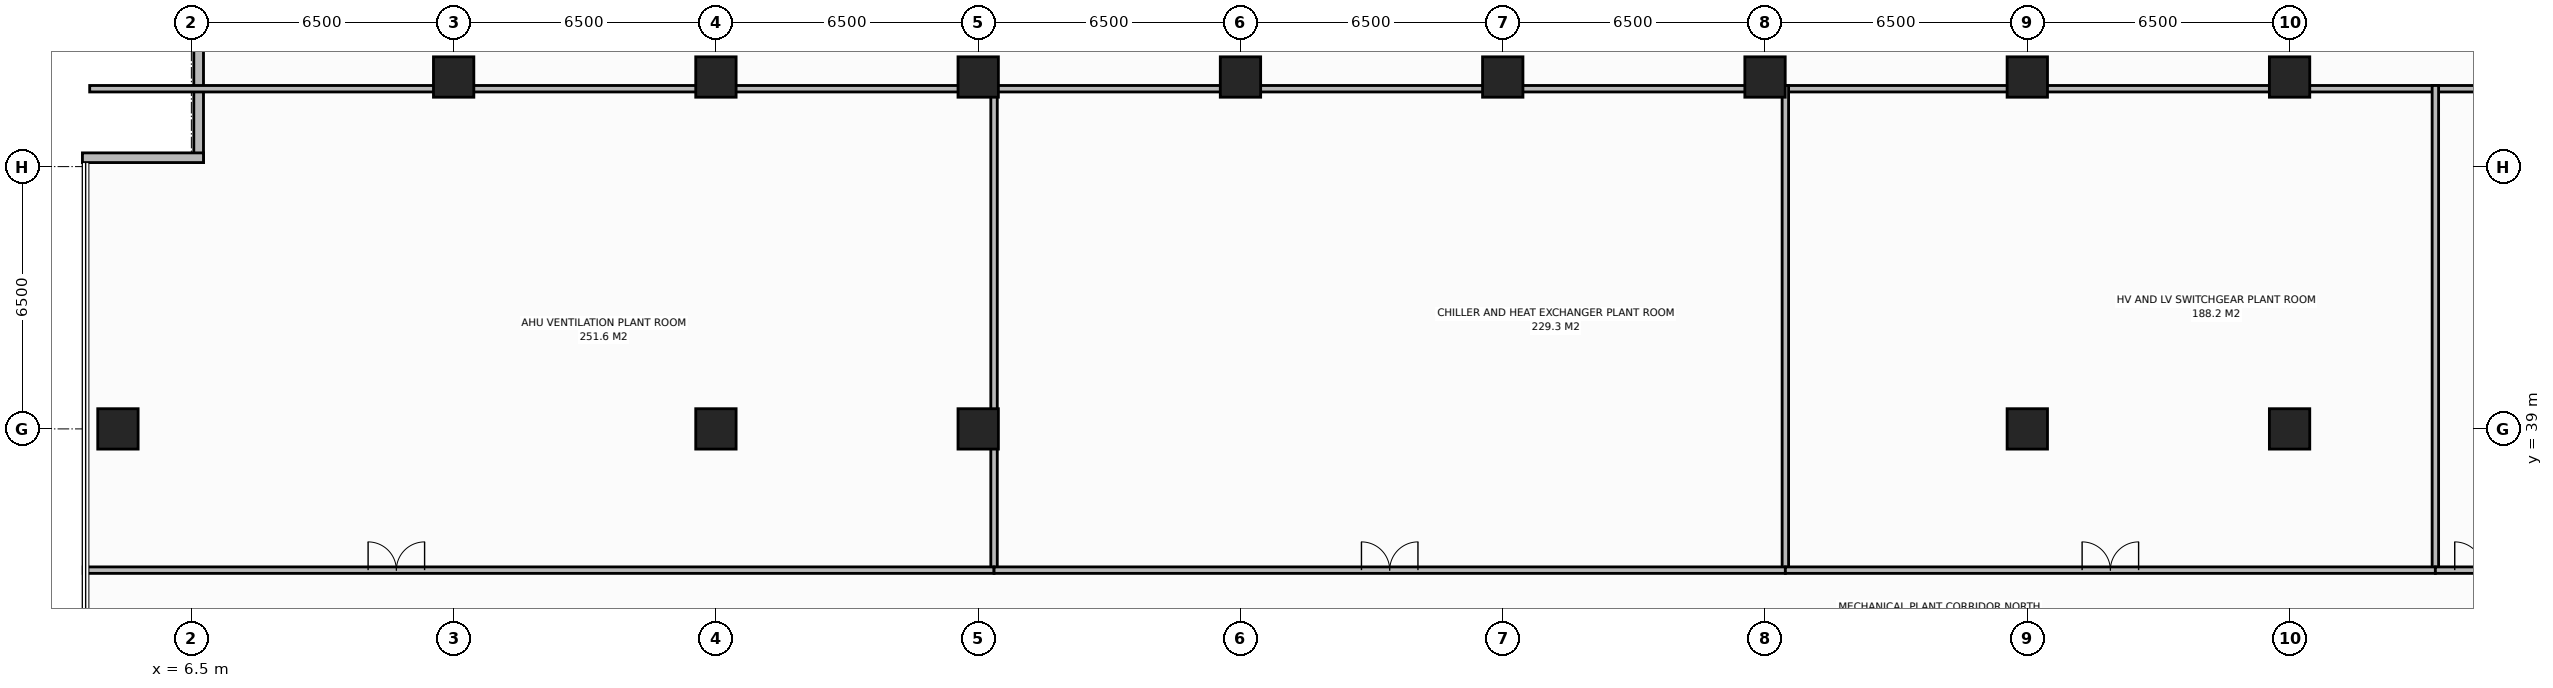
"""IFC4 building model, lengths in metres.
Left out: names, types, materials, properties, quantities, classifications, styles, units other than length and angle.
Written with IfcOpenShell. Run it as: python <this file> out.ifc"""

import sys

from ifc_helpers import new_model, si_unit, direction, frame, frame_2d, origin, origin_2d, place, context, subcontext, project, spatial, rectangle, extrude, element, fill, save


model = new_model("IFC4")
c1 = context("Model", 3, precision=1e-05, world=origin(), true_north=direction((0.0, 1.0)))
c2 = subcontext(c1, "Body", "Model", "MODEL_VIEW")
j1 = project(units=[si_unit("LENGTHUNIT", "METRE"), si_unit("PLANEANGLEUNIT", "RADIAN")], contexts=[c1])
p1 = place(None, origin())
s1 = spatial("IfcSite", under=j1, at=p1, CompositionType="ELEMENT")
p2 = place(p1, origin())
s2 = spatial("IfcBuilding", under=s1, at=p2, CompositionType="ELEMENT")
p3 = place(p2, frame((0.0, 0.0, 197.4)))
s3 = spatial("IfcBuildingStorey", under=s2, at=p3, CompositionType="ELEMENT", Elevation=197.4)
for number, where, z_axis, x_axis in (
    (1, (19.5, 39.0, 0.0), (0.0, 0.0, 1.0), (1.0, 0.0, 0.0)),
    (2, (58.5, 39.0, 0.0), (0.0, 0.0, 1.0), (1.0, 0.0, 0.0)),
    (3, (26.0, 39.0, 0.0), (0.0, 0.0, 1.0), (1.0, 0.0, 0.0)),
    (4, (52.0, 39.0, 0.0), (0.0, 0.0, 1.0), (1.0, 0.0, 0.0)),
    (5, (13.0, 47.72, 0.0), (0.0, 0.0, 1.0), (1.0, 0.0, 0.0)),
    (6, (19.5, 47.72, 0.0), (0.0, 0.0, 1.0), (1.0, 0.0, 0.0)),
    (7, (26.0, 47.72, 0.0), (0.0, 0.0, 1.0), (1.0, 0.0, 0.0)),
    (8, (32.5, 47.72, 0.0), (0.0, 0.0, 1.0), (1.0, 0.0, 0.0)),
    (9, (39.0, 47.72, 0.0), (0.0, 0.0, 1.0), (1.0, 0.0, 0.0)),
    (10, (45.5, 47.72, 0.0), (0.0, 0.0, 1.0), (1.0, 0.0, 0.0)),
    (11, (52.0, 47.72, 0.0), (0.0, 0.0, 1.0), (1.0, 0.0, 0.0)),
    (12, (58.5, 47.72, 0.0), (0.0, 0.0, 1.0), (1.0, 0.0, 0.0)),
    (13, (4.68, 39.0, 0.0), (0.0, 0.0, 1.0), (1.0, 0.0, 0.0)),
):
    element("IfcColumn", number, at=place(p3, frame(where, z_axis=z_axis, x_axis=x_axis)), inside=s3, PredefinedType="COLUMN", context=c2, shape_type="SweptSolid", body=[
        extrude(rectangle(XDim=1.0, YDim=1.0, at=origin_2d()), origin(), (0.0, 0.0, 1.0), 5.0),
    ])
for number, where, z_axis, x_axis in (
    (14, (6.68, 45.6, 0.0), (0.0, 0.0, 1.0), (0.0, 1.0, 0.0)),
    (15, (3.8, 45.72, 0.0), (0.0, 0.0, 1.0), (1.0, 0.0, 0.0)),
):
    element("IfcWall", number, at=place(p3, frame(where, z_axis=z_axis, x_axis=x_axis)), inside=s3, PredefinedType="STANDARD", context=c2, shape_type="SweptSolid", body=[
        extrude(rectangle(XDim=3.0, YDim=0.24, at=frame_2d((1.5, 0.0))), origin(), (0.0, 0.0, 1.0), 4.78),
    ])
p4 = place(p3, frame((3.98, 47.43, 0.0), z_axis=(0.0, 0.0, 1.0), x_axis=(1.0, 0.0, 0.0)))
e16 = element("IfcWall", 16, at=p4, inside=s3, PredefinedType="STANDARD", context=c2, shape_type="SweptSolid", body=[
    extrude(rectangle(XDim=70.04, YDim=0.16, at=frame_2d((35.02, 0.0))), origin(), (0.0, 0.0, 1.0), 4.78),
])
p5 = place(p3, frame((26.393, 35.5, 0.0), z_axis=(0.0, 0.0, 1.0), x_axis=(0.0, 1.0, 0.0)))
e17 = element("IfcWall", 17, at=p5, inside=s3, PredefinedType="STANDARD", context=c2, shape_type="SweptSolid", body=[
    extrude(rectangle(XDim=12.01, YDim=0.16, at=frame_2d((6.005, 0.0))), origin(), (0.0, 0.0, 1.0), 3.26),
])
p6 = place(p3, frame((3.82, 35.5, 0.0), z_axis=(0.0, 0.0, 1.0), x_axis=(1.0, 0.0, 0.0)))
e18 = element("IfcWall", 18, at=p6, inside=s3, PredefinedType="STANDARD", context=c2, shape_type="SweptSolid", body=[
    extrude(rectangle(XDim=22.573, YDim=0.16, at=frame_2d((11.286, 0.0))), origin(), (0.0, 0.0, 1.0), 4.78),
])
p7 = place(p6, frame((7.06, 0.0, 0.0)))
e19 = element("IfcOpeningElement", 19, at=p7, cuts=e18, PredefinedType="OPENING", context=c2, shape_type="SweptSolid", body=[
    extrude(rectangle(XDim=1.4, YDim=2.2, at=frame_2d((0.7, 1.1))), frame((0.0, 0.09, 0.0), z_axis=(0.0, -1.0, 0.0), x_axis=(1.0, 0.0, 0.0)), (0.0, 0.0, 1.0), 0.18),
])
p8 = place(p3, frame((46.004, 35.5, 0.0), z_axis=(0.0, 0.0, 1.0), x_axis=(0.0, 1.0, 0.0)))
e20 = element("IfcWall", 20, at=p8, inside=s3, PredefinedType="STANDARD", context=c2, shape_type="SweptSolid", body=[
    extrude(rectangle(XDim=12.01, YDim=0.16, at=frame_2d((6.005, 0.0))), origin(), (0.0, 0.0, 1.0), 3.26),
])
p9 = place(p3, frame((26.393, 35.5, 0.0), z_axis=(0.0, 0.0, 1.0), x_axis=(1.0, 0.0, 0.0)))
e21 = element("IfcWall", 21, at=p9, inside=s3, PredefinedType="STANDARD", context=c2, shape_type="SweptSolid", body=[
    extrude(rectangle(XDim=19.611, YDim=0.16, at=frame_2d((9.806, 0.0))), origin(), (0.0, 0.0, 1.0), 4.78),
])
p10 = place(p9, frame((9.106, 0.0, 0.0)))
e22 = element("IfcOpeningElement", 22, at=p10, cuts=e21, PredefinedType="OPENING", context=c2, shape_type="SweptSolid", body=[
    extrude(rectangle(XDim=1.4, YDim=2.2, at=frame_2d((0.7, 1.1))), frame((0.0, 0.09, 0.0), z_axis=(0.0, -1.0, 0.0), x_axis=(1.0, 0.0, 0.0)), (0.0, 0.0, 1.0), 0.18),
])
p11 = place(p3, frame((62.113, 35.5, 0.0), z_axis=(0.0, 0.0, 1.0), x_axis=(0.0, 1.0, 0.0)))
e23 = element("IfcWall", 23, at=p11, inside=s3, PredefinedType="STANDARD", context=c2, shape_type="SweptSolid", body=[
    extrude(rectangle(XDim=12.01, YDim=0.16, at=frame_2d((6.005, 0.0))), origin(), (0.0, 0.0, 1.0), 4.78),
])
p12 = place(p3, frame((46.004, 35.5, 0.0), z_axis=(0.0, 0.0, 1.0), x_axis=(1.0, 0.0, 0.0)))
e24 = element("IfcWall", 24, at=p12, inside=s3, PredefinedType="STANDARD", context=c2, shape_type="SweptSolid", body=[
    extrude(rectangle(XDim=16.109, YDim=0.16, at=frame_2d((8.055, 0.0))), origin(), (0.0, 0.0, 1.0), 4.78),
])
p13 = place(p12, frame((7.354, 0.0, 0.0)))
e25 = element("IfcOpeningElement", 25, at=p13, cuts=e24, PredefinedType="OPENING", context=c2, shape_type="SweptSolid", body=[
    extrude(rectangle(XDim=1.4, YDim=2.2, at=frame_2d((0.7, 1.1))), frame((0.0, 0.09, 0.0), z_axis=(0.0, -1.0, 0.0), x_axis=(1.0, 0.0, 0.0)), (0.0, 0.0, 1.0), 0.18),
])
p14 = place(p3, frame((62.113, 35.5, 0.0), z_axis=(0.0, 0.0, 1.0), x_axis=(1.0, 0.0, 0.0)))
e26 = element("IfcWall", 26, at=p14, inside=s3, PredefinedType="STANDARD", context=c2, shape_type="SweptSolid", body=[
    extrude(rectangle(XDim=12.067, YDim=0.16, at=frame_2d((6.033, 0.0))), origin(), (0.0, 0.0, 1.0), 4.78),
])
p15 = place(p14, frame((0.48, 0.0, 0.0)))
e27 = element("IfcOpeningElement", 27, at=p15, cuts=e26, PredefinedType="OPENING", context=c2, shape_type="SweptSolid", body=[
    extrude(rectangle(XDim=1.4, YDim=2.2, at=frame_2d((0.7, 1.1))), frame((0.0, 0.09, 0.0), z_axis=(0.0, -1.0, 0.0), x_axis=(1.0, 0.0, 0.0)), (0.0, 0.0, 1.0), 0.18),
])
p16 = place(p7, origin())
e28 = element("IfcDoor", 28, at=p16, inside=s3, OperationType="DOUBLE_DOOR_SINGLE_SWING", PredefinedType="DOOR", context=c2, shape_type="SweptSolid", body=[
    extrude(rectangle(XDim=1.4, YDim=2.2, at=frame_2d((0.7, 1.1))), frame((0.0, 0.025, 0.0), z_axis=(0.0, -1.0, 0.0), x_axis=(1.0, 0.0, 0.0)), (0.0, 0.0, 1.0), 0.05),
])
fill(e19, e28)
p17 = place(p10, origin())
e29 = element("IfcDoor", 29, at=p17, inside=s3, OperationType="DOUBLE_DOOR_SINGLE_SWING", PredefinedType="DOOR", context=c2, shape_type="SweptSolid", body=[
    extrude(rectangle(XDim=1.4, YDim=2.2, at=frame_2d((0.7, 1.1))), frame((0.0, 0.025, 0.0), z_axis=(0.0, -1.0, 0.0), x_axis=(1.0, 0.0, 0.0)), (0.0, 0.0, 1.0), 0.05),
])
fill(e22, e29)
p18 = place(p13, origin())
e30 = element("IfcDoor", 30, at=p18, inside=s3, OperationType="DOUBLE_DOOR_SINGLE_SWING", PredefinedType="DOOR", context=c2, shape_type="SweptSolid", body=[
    extrude(rectangle(XDim=1.4, YDim=2.2, at=frame_2d((0.7, 1.1))), frame((0.0, 0.025, 0.0), z_axis=(0.0, -1.0, 0.0), x_axis=(1.0, 0.0, 0.0)), (0.0, 0.0, 1.0), 0.05),
])
fill(e25, e30)
p19 = place(p15, origin())
e31 = element("IfcDoor", 31, at=p19, inside=s3, OperationType="DOUBLE_DOOR_SINGLE_SWING", PredefinedType="DOOR", context=c2, shape_type="SweptSolid", body=[
    extrude(rectangle(XDim=1.4, YDim=2.2, at=frame_2d((0.7, 1.1))), frame((0.0, 0.025, 0.0), z_axis=(0.0, -1.0, 0.0), x_axis=(1.0, 0.0, 0.0)), (0.0, 0.0, 1.0), 0.05),
])
fill(e27, e31)
save(model, sys.argv[1])
